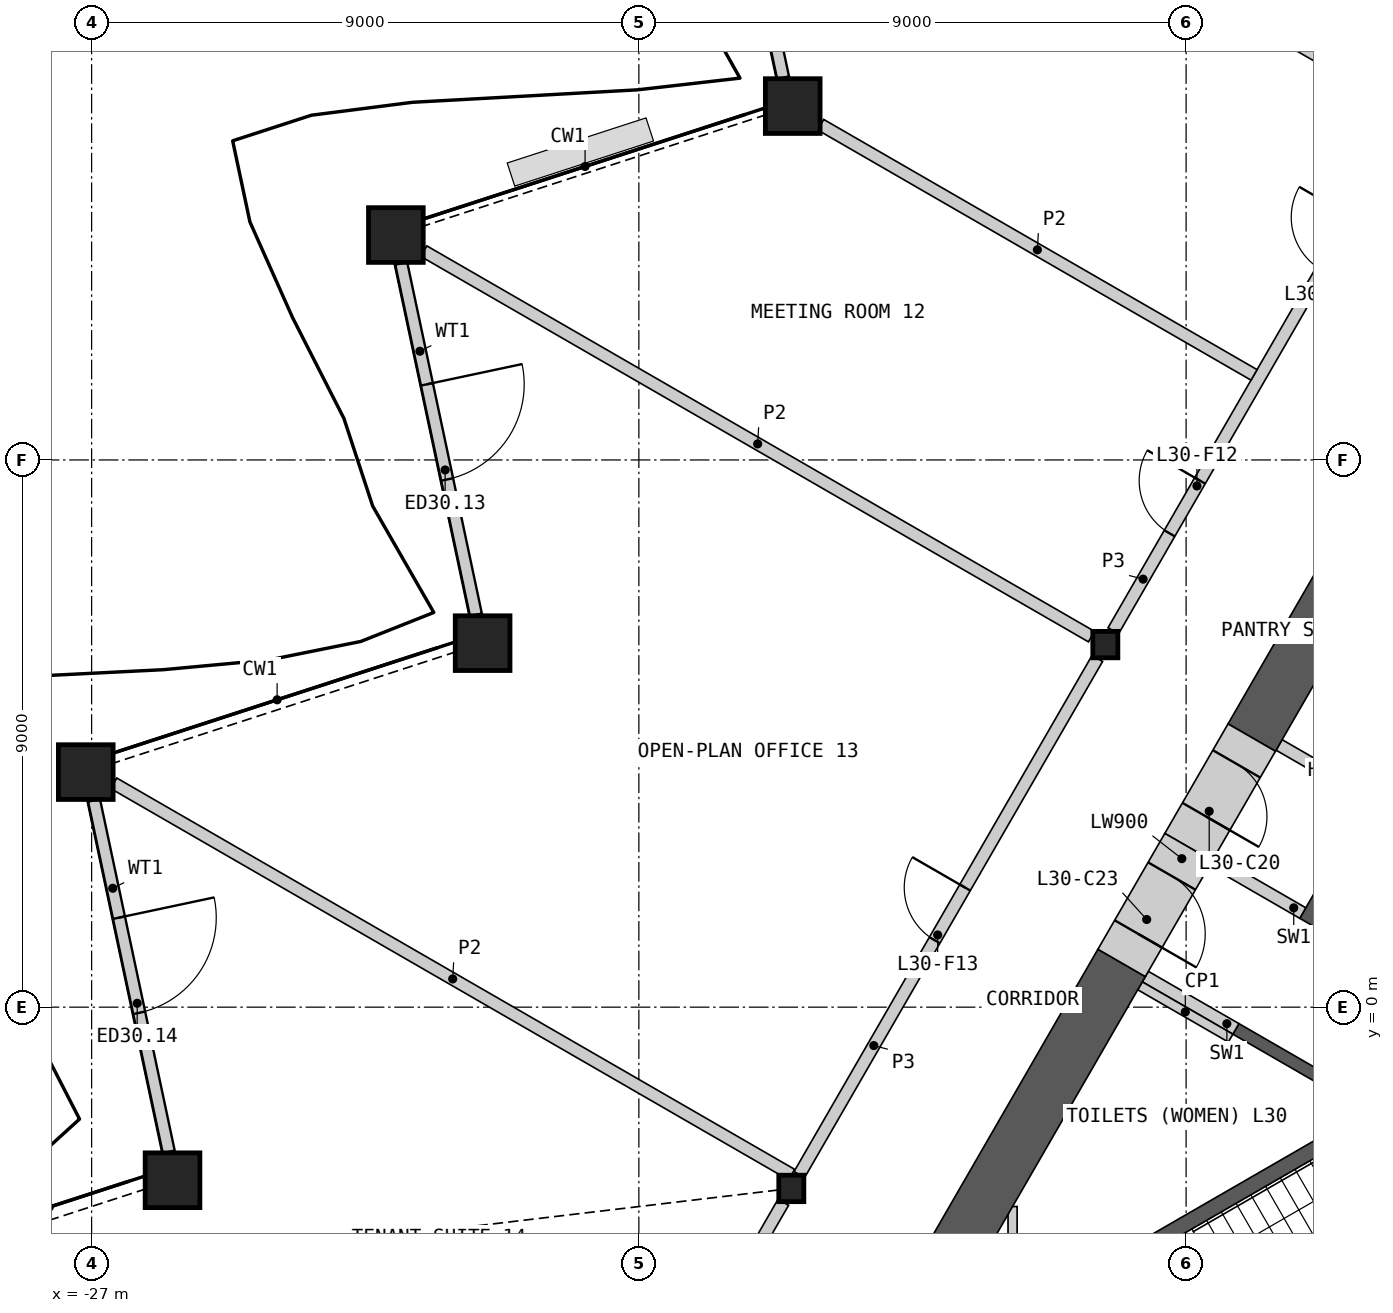
"""IFC4 building model, lengths in metres.
Left out: names, types, materials, properties, quantities, classifications, styles, units other than length and angle.
Written with IfcOpenShell. Run it as: python <this file> out.ifc"""

import sys

from ifc_helpers import new_model, si_unit, direction, frame, frame_2d, origin, origin_2d, place, context, subcontext, project, spatial, polyline, rectangle, hollow_rectangle, i_section, outline, extrude, element, fill, save


model = new_model("IFC4")
c1 = context("Model", 3, precision=1e-05, world=origin(), true_north=direction((0.0, 1.0)))
c2 = subcontext(c1, "Body", "Model", "MODEL_VIEW")
j1 = project(units=[si_unit("LENGTHUNIT", "METRE"), si_unit("PLANEANGLEUNIT", "RADIAN")], contexts=[c1])
p1 = place(None, origin())
s1 = spatial("IfcSite", under=j1, at=p1, CompositionType="ELEMENT")
p2 = place(p1, origin())
s2 = spatial("IfcBuilding", under=s1, at=p2, CompositionType="ELEMENT")
p3 = place(p2, frame((0.0, 0.0, 141.6)))
s3 = spatial("IfcBuildingStorey", under=s2, at=p3, CompositionType="ELEMENT", Elevation=141.6)
for number, where, z_axis, x_axis in (
    (1, (-15.469, 14.82, 0.0), (0.0, 0.0, 1.0), (1.0, 0.0, 0.0)),
    (2, (-21.996, 12.699, 0.0), (0.0, 0.0, 1.0), (1.0, 0.0, 0.0)),
    (3, (-20.57, 5.987, 0.0), (0.0, 0.0, 1.0), (1.0, 0.0, 0.0)),
    (4, (-27.096, 3.866, 0.0), (0.0, 0.0, 1.0), (1.0, 0.0, 0.0)),
    (5, (-25.669, -2.846, 0.0), (0.0, 0.0, 1.0), (1.0, 0.0, 0.0)),
):
    element("IfcColumn", number, at=place(p3, frame(where, z_axis=z_axis, x_axis=x_axis)), inside=s3, PredefinedType="COLUMN", context=c2, shape_type="SweptSolid", body=[
        extrude(hollow_rectangle(XDim=0.9, YDim=0.9, WallThickness=0.06, at=origin_2d()), origin(), (0.0, 0.0, 1.0), 4.2),
    ])
for number, where, z_axis, x_axis in (
    (6, (-10.328, 5.963, 0.0), (0.0, 0.0, 1.0), (1.0, 0.0, 0.0)),
    (7, (-15.493, -2.982, 0.0), (0.0, 0.0, 1.0), (1.0, 0.0, 0.0)),
):
    element("IfcColumn", number, at=place(p3, frame(where, z_axis=z_axis, x_axis=x_axis)), inside=s3, PredefinedType="COLUMN", context=c2, shape_type="SweptSolid", body=[
        extrude(i_section(OverallWidth=0.412, OverallDepth=0.435, WebThickness=0.036, FlangeThickness=0.057, at=origin_2d()), origin(), (0.0, 0.0, 1.0), 4.2),
    ])
p4 = place(p3, frame((-16.857, 21.066, 0.0), z_axis=(0.0, 0.0, 1.0), x_axis=(0.207917562075, -0.978146352741, 0.0)))
e8 = element("IfcWall", 8, at=p4, inside=s3, PredefinedType="SOLIDWALL", context=c2, shape_type="SweptSolid", body=[
    extrude(rectangle(XDim=5.909, YDim=0.2, at=frame_2d((2.954, 0.0))), origin(), (0.0, 0.0, 1.0), 3.189),
])
p5 = place(p4, frame((2.096, 0.0, 0.0)))
e9 = element("IfcOpeningElement", 9, at=p5, cuts=e8, PredefinedType="OPENING", context=c2, shape_type="SweptSolid", body=[
    extrude(rectangle(XDim=1.6, YDim=2.4, at=frame_2d((0.8, 1.2))), frame((0.0, 0.11, 0.0), z_axis=(0.0, -1.0, 0.0), x_axis=(1.0, 0.0, 0.0)), (0.0, 0.0, 1.0), 0.22),
])
p6 = place(p3, frame((-21.908, 12.233, 0.0), z_axis=(0.0, 0.0, 1.0), x_axis=(0.207886430801, -0.978152969575, 0.0)))
e10 = element("IfcWall", 10, at=p6, inside=s3, PredefinedType="SOLIDWALL", context=c2, shape_type="SweptSolid", body=[
    extrude(rectangle(XDim=5.908, YDim=0.2, at=frame_2d((2.954, 0.0))), origin(), (0.0, 0.0, 1.0), 3.189),
])
p7 = place(p6, frame((2.033, 0.0, 0.0)))
e11 = element("IfcOpeningElement", 11, at=p7, cuts=e10, PredefinedType="OPENING", context=c2, shape_type="SweptSolid", body=[
    extrude(rectangle(XDim=1.6, YDim=2.4, at=frame_2d((0.8, 1.2))), frame((0.0, 0.11, 0.0), z_axis=(0.0, -1.0, 0.0), x_axis=(1.0, 0.0, 0.0)), (0.0, 0.0, 1.0), 0.22),
])
p8 = place(p3, frame((-26.96, 3.401, 0.0), z_axis=(0.0, 0.0, 1.0), x_axis=(0.207883954519, -0.978153495855, 0.0)))
e12 = element("IfcWall", 12, at=p8, inside=s3, PredefinedType="SOLIDWALL", context=c2, shape_type="SweptSolid", body=[
    extrude(rectangle(XDim=5.91, YDim=0.2, at=frame_2d((2.955, 0.0))), origin(), (0.0, 0.0, 1.0), 3.189),
])
p9 = place(p8, frame((1.971, 0.0, 0.0)))
e13 = element("IfcOpeningElement", 13, at=p9, cuts=e12, PredefinedType="OPENING", context=c2, shape_type="SweptSolid", body=[
    extrude(rectangle(XDim=1.6, YDim=2.4, at=frame_2d((0.8, 1.2))), frame((0.0, 0.11, 0.0), z_axis=(0.0, -1.0, 0.0), x_axis=(1.0, 0.0, 0.0)), (0.0, 0.0, 1.0), 0.22),
])
p10 = place(p3, origin())
e14 = element("IfcWall", 14, at=p10, inside=s3, PredefinedType="SHEAR", context=c2, shape_type="SweptSolid", body=[
    extrude(outline(polyline([(-6.061, -1.697), (-8.231, -0.444), (-8.131, -0.271), (-5.96, -1.524), (-6.061, -1.697)])), origin(), (0.0, 0.0, 1.0), 3.8),
])
p11 = place(p3, origin())
e15 = element("IfcWall", 15, at=p11, inside=s3, PredefinedType="SHEAR", context=c2, shape_type="SweptSolid", body=[
    extrude(outline(polyline([(-4.96, 0.208), (-7.131, 1.461), (-5.931, 3.54), (-3.76, 2.287), (-3.861, 2.113), (-5.852, 3.263), (-6.852, 1.531), (-4.861, 0.381), (-4.96, 0.208)])), origin(), (0.0, 0.0, 1.0), 3.8),
])
p12 = place(p3, frame((-5.981, 3.453, 0.0), z_axis=(0.0, 0.0, 1.0), x_axis=(-0.866060346521, 0.499939472521, 0.0)))
e16 = element("IfcWall", 16, at=p12, inside=s3, PredefinedType="SHEAR", context=c2, shape_type="SweptSolid", body=[
    extrude(rectangle(XDim=1.72, YDim=0.2, at=frame_2d((0.86, 0.0))), origin(), (0.0, 0.0, 1.0), 3.8),
])
for number, where, z_axis, x_axis in (
    (17, (-7.081, 1.548, 0.0), (0.0, 0.0, 1.0), (-0.866, 0.5, 0.0)),
    (18, (-8.181, -0.357, 0.0), (0.0, 0.0, 1.0), (-0.866, 0.5, 0.0)),
):
    element("IfcWall", number, at=place(p3, frame(where, z_axis=z_axis, x_axis=x_axis)), inside=s3, PredefinedType="SHEAR", context=c2, shape_type="SweptSolid", body=[
        extrude(rectangle(XDim=1.72, YDim=0.2, at=frame_2d((0.86, 0.0))), origin(), (0.0, 0.0, 1.0), 3.8),
    ])
p13 = place(p3, origin())
e19 = element("IfcWall", 19, at=p13, inside=s3, PredefinedType="SHEAR", context=c2, shape_type="SweptSolid", body=[
    extrude(outline(polyline([(-5.307, -1.281), (-10.374, -4.206), (-10.032, -4.298), (-5.182, -1.498), (-5.307, -1.281)])), origin(), (0.0, 0.0, 1.0), 3.8),
])
p14 = place(p3, frame((-8.268, -0.509, 0.0), z_axis=(0.0, 0.0, 1.0), x_axis=(-0.866024871741, 0.500000921525, 0.0)))
e20 = element("IfcWall", 20, at=p14, inside=s3, PredefinedType="PARTITIONING", context=c2, shape_type="SweptSolid", body=[
    extrude(rectangle(XDim=1.72, YDim=0.15, at=frame_2d((0.86, 0.0))), origin(), (0.0, 0.0, 1.0), 3.8),
])
p15 = place(p3, frame((-11.854, -8.626, 0.0), z_axis=(0.0, 0.0, 1.0), x_axis=(0.0, 1.0, 0.0)))
e21 = element("IfcWall", 21, at=p15, inside=s3, PredefinedType="PARTITIONING", context=c2, shape_type="SweptSolid", body=[
    extrude(rectangle(XDim=5.347, YDim=0.15, at=frame_2d((2.674, 0.0))), origin(), (0.0, 0.0, 1.0), 3.8),
])
p16 = place(p3, frame((-3.512, 12.069, 0.0), z_axis=(0.0, 0.0, 1.0), x_axis=(-0.500002126466, -0.866024176065, 0.0)))
e22 = element("IfcWall", 22, at=p16, inside=s3, PredefinedType="SHEAR", context=c2, shape_type="SweptSolid", body=[
    extrude(rectangle(XDim=8.816, YDim=0.9, at=frame_2d((4.408, 0.0))), origin(), (0.0, 0.0, 1.0), 3.8),
])
p17 = place(p3, frame((-10.06, 0.728, 0.0), z_axis=(0.0, 0.0, 1.0), x_axis=(-0.500002975332, -0.866023685969, 0.0)))
e23 = element("IfcWall", 23, at=p17, inside=s3, PredefinedType="SHEAR", context=c2, shape_type="SweptSolid", body=[
    extrude(rectangle(XDim=6.429, YDim=0.9, at=frame_2d((3.214, 0.0))), origin(), (0.0, 0.0, 1.0), 3.8),
])
p18 = place(p3, frame((-7.92, 4.434, 0.0), z_axis=(0.0, 0.0, 1.0), x_axis=(-0.499939227269, -0.866060488094, 0.0)))
e24 = element("IfcWall", 24, at=p18, inside=s3, PredefinedType="SHEAR", context=c2, shape_type="SweptSolid", body=[
    extrude(rectangle(XDim=2.08, YDim=0.9, at=frame_2d((1.04, 0.0))), origin(), (0.0, 0.0, 1.0), 3.8),
])
p19 = place(p18, frame((0.5, 0.0, 0.0)))
e25 = element("IfcOpeningElement", 25, at=p19, cuts=e24, PredefinedType="OPENING", context=c2, shape_type="SweptSolid", body=[
    extrude(rectangle(XDim=1.0, YDim=2.1, at=frame_2d((0.5, 1.05))), frame((0.0, 0.46, 0.0), z_axis=(0.0, -1.0, 0.0), x_axis=(1.0, 0.0, 0.0)), (0.0, 0.0, 1.0), 0.92),
])
p20 = place(p3, frame((-8.96, 2.633, 0.0), z_axis=(0.0, 0.0, 1.0), x_axis=(-0.50002983664, -0.866008176907, 0.0)))
e26 = element("IfcWall", 26, at=p20, inside=s3, PredefinedType="SHEAR", context=c2, shape_type="SweptSolid", body=[
    extrude(rectangle(XDim=2.2, YDim=0.9, at=frame_2d((1.1, 0.0))), origin(), (0.0, 0.0, 1.0), 3.8),
])
p21 = place(p20, frame((0.55, 0.0, 0.0)))
e27 = element("IfcOpeningElement", 27, at=p21, cuts=e26, PredefinedType="OPENING", context=c2, shape_type="SweptSolid", body=[
    extrude(rectangle(XDim=1.1, YDim=2.1, at=frame_2d((0.55, 1.05))), frame((0.0, 0.46, 0.0), z_axis=(0.0, -1.0, 0.0), x_axis=(1.0, 0.0, 0.0)), (0.0, 0.0, 1.0), 0.92),
])
p22 = place(p3, frame((-15.361, -2.754, 0.0), z_axis=(0.0, 0.0, 1.0), x_axis=(0.500004141693, 0.866023012564, 0.0)))
e28 = element("IfcWall", 28, at=p22, inside=s3, PredefinedType="PARTITIONING", context=c2, shape_type="SweptSolid", body=[
    extrude(rectangle(XDim=9.803, YDim=0.2, at=frame_2d((4.902, 0.0))), origin(), (0.0, 0.0, 1.0), 3.8),
])
p23 = place(p22, frame((4.452, 0.0, 0.0)))
e29 = element("IfcOpeningElement", 29, at=p23, cuts=e28, PredefinedType="OPENING", context=c2, shape_type="SweptSolid", body=[
    extrude(rectangle(XDim=1.0, YDim=2.1, at=frame_2d((0.5, 1.05))), frame((0.0, 0.11, 0.0), z_axis=(0.0, -1.0, 0.0), x_axis=(1.0, 0.0, 0.0)), (0.0, 0.0, 1.0), 0.22),
])
p24 = place(p3, frame((-10.197, 6.19, 0.0), z_axis=(0.0, 0.0, 1.0), x_axis=(0.500012035596, 0.866018454918, 0.0)))
e30 = element("IfcWall", 30, at=p24, inside=s3, PredefinedType="PARTITIONING", context=c2, shape_type="SweptSolid", body=[
    extrude(rectangle(XDim=9.803, YDim=0.2, at=frame_2d((4.902, 0.0))), origin(), (0.0, 0.0, 1.0), 3.8),
])
p25 = place(p24, frame((6.853, 0.0, 0.0)))
e31 = element("IfcOpeningElement", 31, at=p25, cuts=e30, PredefinedType="OPENING", context=c2, shape_type="SweptSolid", body=[
    extrude(rectangle(XDim=1.0, YDim=2.1, at=frame_2d((0.5, 1.05))), frame((0.0, 0.11, 0.0), z_axis=(0.0, -1.0, 0.0), x_axis=(1.0, 0.0, 0.0)), (0.0, 0.0, 1.0), 0.22),
])
p26 = place(p24, frame((1.851, 0.0, 0.0)))
e32 = element("IfcOpeningElement", 32, at=p26, cuts=e30, PredefinedType="OPENING", context=c2, shape_type="SweptSolid", body=[
    extrude(rectangle(XDim=1.0, YDim=2.1, at=frame_2d((0.5, 1.05))), frame((0.0, 0.11, 0.0), z_axis=(0.0, -1.0, 0.0), x_axis=(1.0, 0.0, 0.0)), (0.0, 0.0, 1.0), 0.22),
])
p27 = place(p3, frame((-18.744, -8.613, 0.0), z_axis=(0.0, 0.0, 1.0), x_axis=(0.499997920671, 0.866026604282, 0.0)))
e33 = element("IfcWall", 33, at=p27, inside=s3, PredefinedType="PARTITIONING", context=c2, shape_type="SweptSolid", body=[
    extrude(rectangle(XDim=6.24, YDim=0.2, at=frame_2d((3.12, 0.0))), origin(), (0.0, 0.0, 1.0), 3.8),
])
p28 = place(p27, frame((2.67, 0.0, 0.0)))
e34 = element("IfcOpeningElement", 34, at=p28, cuts=e33, PredefinedType="OPENING", context=c2, shape_type="SweptSolid", body=[
    extrude(rectangle(XDim=1.0, YDim=2.1, at=frame_2d((0.5, 1.05))), frame((0.0, 0.11, 0.0), z_axis=(0.0, -1.0, 0.0), x_axis=(1.0, 0.0, 0.0)), (0.0, 0.0, 1.0), 0.22),
])
p29 = place(p3, frame((-26.636, 3.682, 0.0), z_axis=(0.0, 0.0, 1.0), x_axis=(0.866026411352, -0.499998254837, 0.0)))
e35 = element("IfcWall", 35, at=p29, inside=s3, PredefinedType="PARTITIONING", context=c2, shape_type="SweptSolid", body=[
    extrude(rectangle(XDim=12.873, YDim=0.2, at=frame_2d((6.437, 0.0))), origin(), (0.0, 0.0, 1.0), 2.885),
])
p30 = place(p3, frame((-16.436, 21.186, 0.0), z_axis=(0.0, 0.0, 1.0), x_axis=(0.866023321739, -0.500003606191, 0.0)))
e36 = element("IfcWall", 36, at=p30, inside=s3, PredefinedType="PARTITIONING", context=c2, shape_type="SweptSolid", body=[
    extrude(rectangle(XDim=12.753, YDim=0.2, at=frame_2d((6.377, 0.0))), origin(), (0.0, 0.0, 1.0), 2.885),
])
p31 = place(p3, frame((-21.536, 12.434, 0.0), z_axis=(0.0, 0.0, 1.0), x_axis=(0.86602461759, -0.500001361726, 0.0)))
e37 = element("IfcWall", 37, at=p31, inside=s3, PredefinedType="PARTITIONING", context=c2, shape_type="SweptSolid", body=[
    extrude(rectangle(XDim=12.679, YDim=0.2, at=frame_2d((6.34, 0.0))), origin(), (0.0, 0.0, 1.0), 2.885),
])
p32 = place(p3, frame((-15.01, 14.514, 0.0), z_axis=(0.0, 0.0, 1.0), x_axis=(0.866018103232, -0.500012644715, 0.0)))
e38 = element("IfcWall", 38, at=p32, inside=s3, PredefinedType="PARTITIONING", context=c2, shape_type="SweptSolid", body=[
    extrude(rectangle(XDim=8.229, YDim=0.2, at=frame_2d((4.115, 0.0))), origin(), (0.0, 0.0, 1.0), 2.885),
])
p33 = place(p7, origin())
e39 = element("IfcDoor", 39, at=p33, inside=s3, OperationType="DOUBLE_DOOR_SINGLE_SWING", PredefinedType="DOOR", context=c2, shape_type="SweptSolid", body=[
    extrude(rectangle(XDim=1.6, YDim=2.4, at=frame_2d((0.8, 1.2))), frame((0.0, 0.025, 0.0), z_axis=(0.0, -1.0, 0.0), x_axis=(1.0, 0.0, 0.0)), (0.0, 0.0, 1.0), 0.05),
])
fill(e11, e39)
p34 = place(p9, origin())
e40 = element("IfcDoor", 40, at=p34, inside=s3, OperationType="DOUBLE_DOOR_SINGLE_SWING", PredefinedType="DOOR", context=c2, shape_type="SweptSolid", body=[
    extrude(rectangle(XDim=1.6, YDim=2.4, at=frame_2d((0.8, 1.2))), frame((0.0, 0.025, 0.0), z_axis=(0.0, -1.0, 0.0), x_axis=(1.0, 0.0, 0.0)), (0.0, 0.0, 1.0), 0.05),
])
fill(e13, e40)
p35 = place(p19, origin())
e41 = element("IfcDoor", 41, at=p35, inside=s3, OperationType="SINGLE_SWING_RIGHT", PredefinedType="DOOR", context=c2, shape_type="SweptSolid", body=[
    extrude(rectangle(XDim=1.0, YDim=2.1, at=frame_2d((0.5, 1.05))), frame((0.0, 0.205, 0.0), z_axis=(0.0, -1.0, 0.0), x_axis=(1.0, 0.0, 0.0)), (0.0, 0.0, 1.0), 0.05),
])
fill(e25, e41)
p36 = place(p21, origin())
e42 = element("IfcDoor", 42, at=p36, inside=s3, OperationType="SINGLE_SWING_RIGHT", PredefinedType="DOOR", context=c2, shape_type="SweptSolid", body=[
    extrude(rectangle(XDim=1.1, YDim=2.1, at=frame_2d((0.55, 1.05))), frame((0.0, 0.205, 0.0), z_axis=(0.0, -1.0, 0.0), x_axis=(1.0, 0.0, 0.0)), (0.0, 0.0, 1.0), 0.05),
])
fill(e27, e42)
p37 = place(p26, origin())
e43 = element("IfcDoor", 43, at=p37, inside=s3, OperationType="SINGLE_SWING_RIGHT", PredefinedType="DOOR", context=c2, shape_type="SweptSolid", body=[
    extrude(rectangle(XDim=1.0, YDim=2.1, at=frame_2d((0.5, 1.05))), frame((0.0, 0.025, 0.0), z_axis=(0.0, -1.0, 0.0), x_axis=(1.0, 0.0, 0.0)), (0.0, 0.0, 1.0), 0.05),
])
fill(e32, e43)
p38 = place(p23, origin())
e44 = element("IfcDoor", 44, at=p38, inside=s3, OperationType="SINGLE_SWING_RIGHT", PredefinedType="DOOR", context=c2, shape_type="SweptSolid", body=[
    extrude(rectangle(XDim=1.0, YDim=2.1, at=frame_2d((0.5, 1.05))), frame((0.0, 0.025, 0.0), z_axis=(0.0, -1.0, 0.0), x_axis=(1.0, 0.0, 0.0)), (0.0, 0.0, 1.0), 0.05),
])
fill(e29, e44)
save(model, sys.argv[1])
